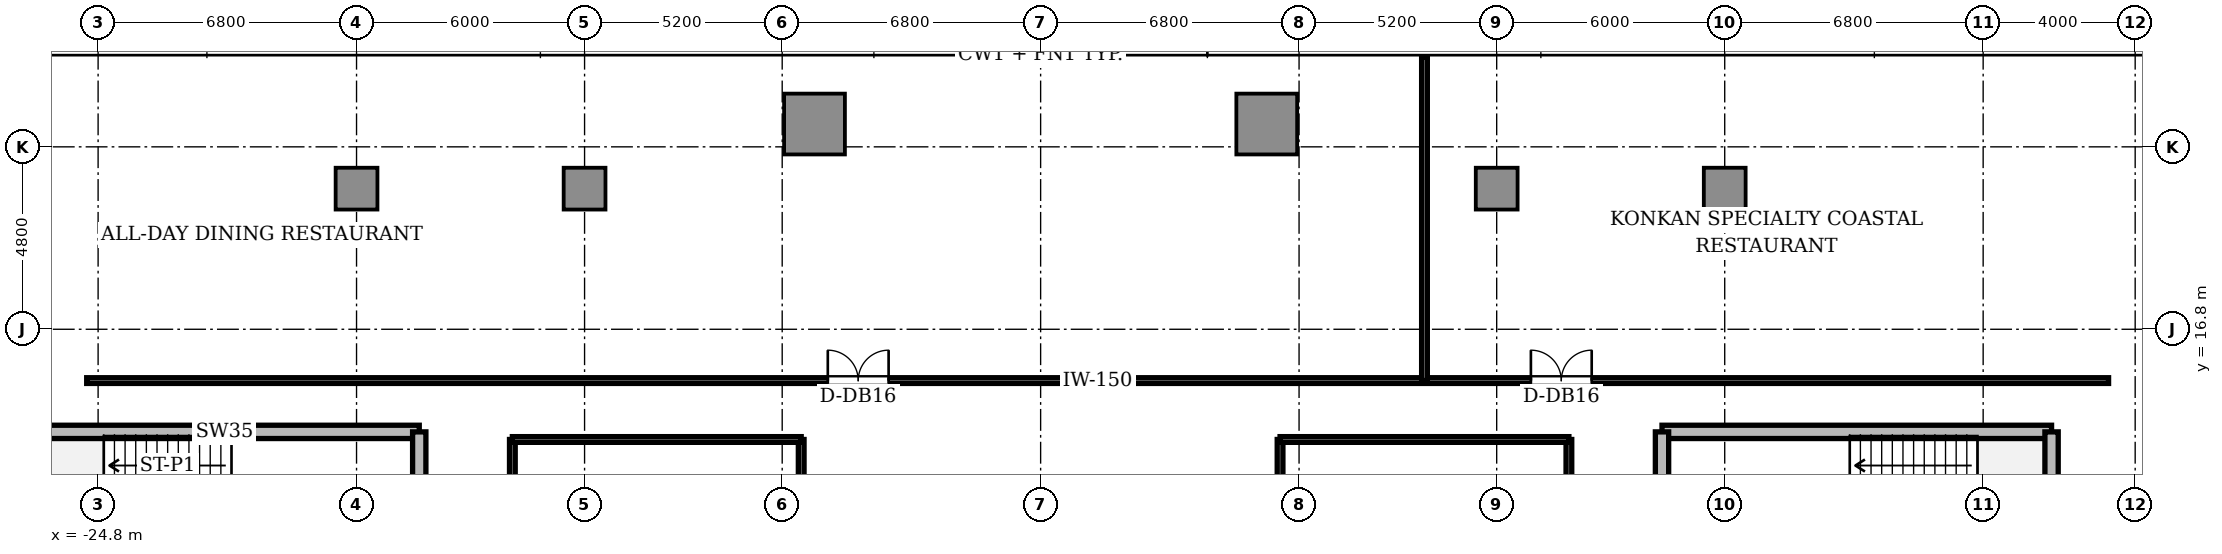
"""IFC4 building model, lengths in metres.
Left out: names, types, materials, properties, quantities, classifications, styles, units other than length and angle.
Written with IfcOpenShell. Run it as: python <this file> out.ifc"""

import sys

from ifc_helpers import new_model, si_unit, direction, frame, frame_2d, origin, origin_2d, place, context, subcontext, project, spatial, rectangle, circle, extrude, source, transform, mapped, element, fill, save


model = new_model("IFC4")
c1 = context("Model", 3, precision=1e-05, world=origin(), true_north=direction((0.0, 1.0)))
c2 = subcontext(c1, "Body", "Model", "MODEL_VIEW")
j1 = project(units=[si_unit("LENGTHUNIT", "METRE"), si_unit("PLANEANGLEUNIT", "RADIAN")], contexts=[c1])
p1 = place(None, origin())
s1 = spatial("IfcSite", under=j1, at=p1, CompositionType="ELEMENT")
p2 = place(p1, origin())
s2 = spatial("IfcBuilding", under=s1, at=p2, CompositionType="ELEMENT")
p3 = place(p2, frame((0.0, 0.0, 4.8)))
s3 = spatial("IfcBuildingStorey", under=s2, at=p3, CompositionType="ELEMENT", Elevation=4.8)
m1 = source(origin(), c2, "Body", "SweptSolid", [
    extrude(rectangle(XDim=1.6, YDim=1.6, at=origin_2d()), origin(), (0.0, 0.0, 1.0), 4.1),
])
for number, where, z_axis, x_axis in (
    (1, (5.95, 22.2, 0.0), (0.0, 0.0, 1.0), (1.0, 0.0, 0.0)),
    (2, (-5.95, 22.2, 0.0), (0.0, 0.0, 1.0), (1.0, 0.0, 0.0)),
):
    element("IfcColumn", number, at=place(p3, frame(where, z_axis=z_axis, x_axis=x_axis)), inside=s3, PredefinedType="COLUMN", context=c2, shape_type="MappedRepresentation", body=[
        mapped(m1, transform((0.0, 0.0, 0.0), scale=1.0)),
    ])
m2 = source(origin(), c2, "Body", "SweptSolid", [
    extrude(circle(Radius=0.55, at=origin_2d()), origin(), (0.0, 0.0, 1.0), 4.1),
])
for number, where, z_axis, x_axis in (
    (3, (-18.0, 20.5, 0.0), (0.0, 0.0, 1.0), (1.0, 0.0, 0.0)),
    (4, (-12.0, 20.5, 0.0), (0.0, 0.0, 1.0), (1.0, 0.0, 0.0)),
    (5, (12.0, 20.5, 0.0), (0.0, 0.0, 1.0), (1.0, 0.0, 0.0)),
    (6, (18.0, 20.5, 0.0), (0.0, 0.0, 1.0), (1.0, 0.0, 0.0)),
):
    element("IfcColumn", number, at=place(p3, frame(where, z_axis=z_axis, x_axis=x_axis)), inside=s3, PredefinedType="COLUMN", context=c2, shape_type="MappedRepresentation", body=[
        mapped(m2, transform((0.0, 0.0, 0.0), scale=1.0)),
    ])
p4 = place(p3, frame((-26.6, 14.1, 0.0), z_axis=(0.0, 0.0, 1.0), x_axis=(1.0, 0.0, 0.0)))
e7 = element("IfcWall", 7, at=p4, inside=s3, PredefinedType="SHEAR", context=c2, shape_type="SweptSolid", body=[
    extrude(rectangle(XDim=10.25, YDim=0.35, at=frame_2d((5.125, 0.0))), origin(), (0.0, 0.0, 1.0), 4.1),
])
p5 = place(p3, frame((-16.35, 10.52, 0.0), z_axis=(0.0, 0.0, 1.0), x_axis=(0.0, 1.0, 0.0)))
e8 = element("IfcWall", 8, at=p5, inside=s3, PredefinedType="SHEAR", context=c2, shape_type="SweptSolid", body=[
    extrude(rectangle(XDim=3.58, YDim=0.35, at=frame_2d((1.79, 0.0))), origin(), (0.0, 0.0, 1.0), 4.1),
])
p6 = place(p5, frame((1.15, 0.0, 0.0)))
e9 = element("IfcOpeningElement", 9, at=p6, cuts=e8, PredefinedType="OPENING", context=c2, shape_type="SweptSolid", body=[
    extrude(rectangle(XDim=1.2, YDim=2.2, at=frame_2d((0.6, 1.1))), frame((0.0, 0.185, 0.0), z_axis=(0.0, -1.0, 0.0), x_axis=(1.0, 0.0, 0.0)), (0.0, 0.0, 1.0), 0.37),
])
p7 = place(p3, frame((16.35, 14.1, 0.0), z_axis=(0.0, 0.0, 1.0), x_axis=(1.0, 0.0, 0.0)))
e10 = element("IfcWall", 10, at=p7, inside=s3, PredefinedType="SHEAR", context=c2, shape_type="SweptSolid", body=[
    extrude(rectangle(XDim=10.25, YDim=0.35, at=frame_2d((5.125, 0.0))), origin(), (0.0, 0.0, 1.0), 4.1),
])
p8 = place(p3, frame((16.35, 10.52, 0.0), z_axis=(0.0, 0.0, 1.0), x_axis=(0.0, 1.0, 0.0)))
e11 = element("IfcWall", 11, at=p8, inside=s3, PredefinedType="SHEAR", context=c2, shape_type="SweptSolid", body=[
    extrude(rectangle(XDim=3.58, YDim=0.35, at=frame_2d((1.79, 0.0))), origin(), (0.0, 0.0, 1.0), 4.1),
])
p9 = place(p8, frame((1.15, 0.0, 0.0)))
e12 = element("IfcOpeningElement", 12, at=p9, cuts=e11, PredefinedType="OPENING", context=c2, shape_type="SweptSolid", body=[
    extrude(rectangle(XDim=1.2, YDim=2.2, at=frame_2d((0.6, 1.1))), frame((0.0, 0.185, 0.0), z_axis=(0.0, -1.0, 0.0), x_axis=(1.0, 0.0, 0.0)), (0.0, 0.0, 1.0), 0.37),
])
p10 = place(p3, frame((26.6, 10.52, 0.0), z_axis=(0.0, 0.0, 1.0), x_axis=(0.0, 1.0, 0.0)))
e13 = element("IfcWall", 13, at=p10, inside=s3, PredefinedType="SHEAR", context=c2, shape_type="SweptSolid", body=[
    extrude(rectangle(XDim=3.58, YDim=0.35, at=frame_2d((1.79, 0.0))), origin(), (0.0, 0.0, 1.0), 4.1),
])
p11 = place(p3, frame((-25.1, 15.45, 0.0), z_axis=(0.0, 0.0, 1.0), x_axis=(1.0, 0.0, 0.0)))
e14 = element("IfcWall", 14, at=p11, inside=s3, PredefinedType="PARTITIONING", context=c2, shape_type="SweptSolid", body=[
    extrude(rectangle(XDim=53.2, YDim=0.15, at=frame_2d((26.6, 0.0))), origin(), (0.0, 0.0, 1.0), 3.65),
])
p12 = place(p11, frame((19.5, 0.0, 0.0)))
e15 = element("IfcOpeningElement", 15, at=p12, cuts=e14, PredefinedType="OPENING", context=c2, shape_type="SweptSolid", body=[
    extrude(rectangle(XDim=1.6, YDim=2.25, at=frame_2d((0.8, 1.125))), frame((0.0, 0.085, 0.0), z_axis=(0.0, -1.0, 0.0), x_axis=(1.0, 0.0, 0.0)), (0.0, 0.0, 1.0), 0.17),
])
p13 = place(p11, frame((38.0, 0.0, 0.0)))
e16 = element("IfcOpeningElement", 16, at=p13, cuts=e14, PredefinedType="OPENING", context=c2, shape_type="SweptSolid", body=[
    extrude(rectangle(XDim=1.6, YDim=2.25, at=frame_2d((0.8, 1.125))), frame((0.0, 0.085, 0.0), z_axis=(0.0, -1.0, 0.0), x_axis=(1.0, 0.0, 0.0)), (0.0, 0.0, 1.0), 0.17),
])
p14 = place(p3, frame((10.1, 15.45, 0.0), z_axis=(0.0, 0.0, 1.0), x_axis=(0.0, 1.0, 0.0)))
e17 = element("IfcWall", 17, at=p14, inside=s3, PredefinedType="PARTITIONING", context=c2, shape_type="SweptSolid", body=[
    extrude(rectangle(XDim=8.52, YDim=0.15, at=frame_2d((4.26, 0.0))), origin(), (0.0, 0.0, 1.0), 3.65),
])
for number, where, z_axis, x_axis in (
    (18, (-13.9, 1.1, 0.0), (0.0, 0.0, 1.0), (0.0, 1.0, 0.0)),
    (19, (-6.3, 1.1, 0.0), (0.0, 0.0, 1.0), (0.0, 1.0, 0.0)),
):
    element("IfcWall", number, at=place(p3, frame(where, z_axis=z_axis, x_axis=x_axis)), inside=s3, PredefinedType="PARTITIONING", context=c2, shape_type="SweptSolid", body=[
        extrude(rectangle(XDim=12.8, YDim=0.15, at=frame_2d((6.4, 0.0))), origin(), (0.0, 0.0, 1.0), 3.65),
    ])
p15 = place(p3, frame((-13.9, 13.9, 0.0), z_axis=(0.0, 0.0, 1.0), x_axis=(1.0, 0.0, 0.0)))
e20 = element("IfcWall", 20, at=p15, inside=s3, PredefinedType="PARTITIONING", context=c2, shape_type="SweptSolid", body=[
    extrude(rectangle(XDim=7.6, YDim=0.15, at=frame_2d((3.8, 0.0))), origin(), (0.0, 0.0, 1.0), 3.65),
])
for number, where, z_axis, x_axis in (
    (21, (6.3, 1.1, 0.0), (0.0, 0.0, 1.0), (0.0, 1.0, 0.0)),
    (22, (13.9, 1.1, 0.0), (0.0, 0.0, 1.0), (0.0, 1.0, 0.0)),
):
    element("IfcWall", number, at=place(p3, frame(where, z_axis=z_axis, x_axis=x_axis)), inside=s3, PredefinedType="PARTITIONING", context=c2, shape_type="SweptSolid", body=[
        extrude(rectangle(XDim=12.8, YDim=0.15, at=frame_2d((6.4, 0.0))), origin(), (0.0, 0.0, 1.0), 3.65),
    ])
p16 = place(p3, frame((6.3, 13.9, 0.0), z_axis=(0.0, 0.0, 1.0), x_axis=(1.0, 0.0, 0.0)))
e23 = element("IfcWall", 23, at=p16, inside=s3, PredefinedType="PARTITIONING", context=c2, shape_type="SweptSolid", body=[
    extrude(rectangle(XDim=7.6, YDim=0.15, at=frame_2d((3.8, 0.0))), origin(), (0.0, 0.0, 1.0), 3.65),
])
m3 = source(origin(), c2, "Body", "SweptSolid", [
    extrude(rectangle(XDim=1.6, YDim=0.05, at=origin_2d()), origin(), (0.0, 0.0, 1.0), 2.25),
])
p17 = place(p12, frame((0.8, 0.0, 0.0)))
e24 = element("IfcDoor", 24, at=p17, inside=s3, OperationType="DOUBLE_DOOR_SINGLE_SWING", PredefinedType="DOOR", context=c2, shape_type="MappedRepresentation", body=[
    mapped(m3, transform((0.0, 0.0, 0.0), scale=1.0)),
])
fill(e15, e24)
p18 = place(p13, frame((0.8, 0.0, 0.0)))
e25 = element("IfcDoor", 25, at=p18, inside=s3, OperationType="DOUBLE_DOOR_SINGLE_SWING", PredefinedType="DOOR", context=c2, shape_type="MappedRepresentation", body=[
    mapped(m3, transform((0.0, 0.0, 0.0), scale=1.0)),
])
fill(e16, e25)
save(model, sys.argv[1])
